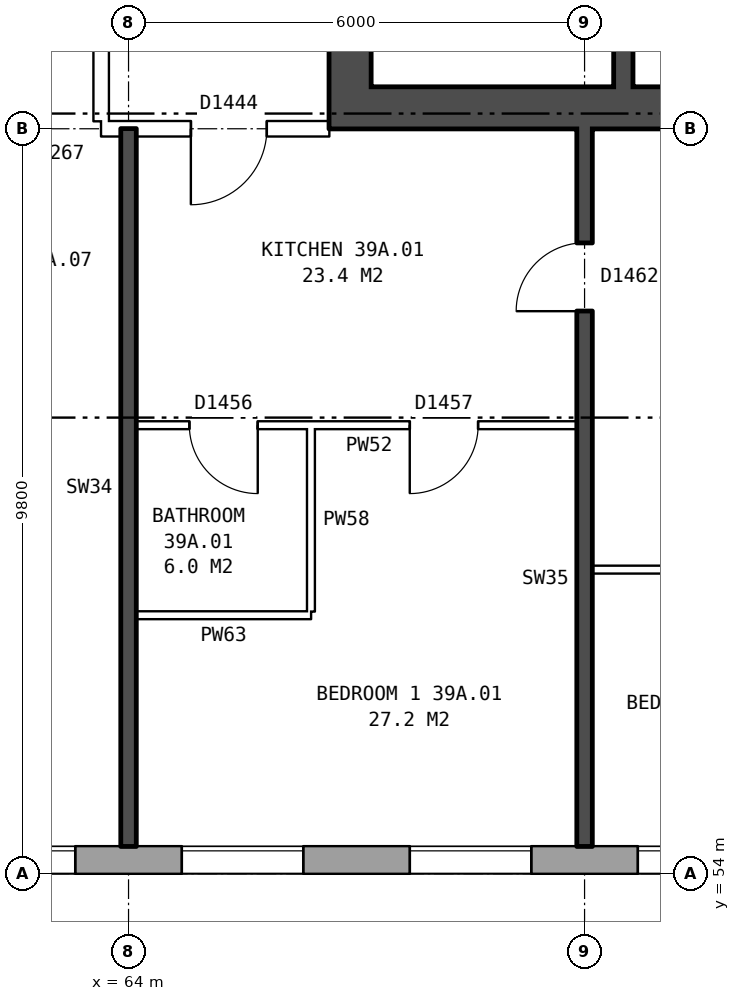
"""IFC4 building model, lengths in metres.
Left out: names, types, materials, properties, quantities, classifications, styles, units other than length and angle.
Written with IfcOpenShell. Run it as: python <this file> out.ifc"""

import sys

from ifc_helpers import new_model, si_unit, direction, frame, frame_2d, origin, place, context, subcontext, project, spatial, rectangle, extrude, element, fill, save


model = new_model("IFC4")
c1 = context("Model", 3, precision=1e-05, world=origin(), true_north=direction((0.0, 1.0)))
c2 = subcontext(c1, "Body", "Model", "MODEL_VIEW")
j1 = project(units=[si_unit("LENGTHUNIT", "METRE"), si_unit("PLANEANGLEUNIT", "RADIAN")], contexts=[c1])
p1 = place(None, origin())
s1 = spatial("IfcSite", under=j1, at=p1, CompositionType="ELEMENT")
p2 = place(p1, origin())
s2 = spatial("IfcBuilding", under=s1, at=p2, CompositionType="ELEMENT")
p3 = place(p2, frame((0.0, 0.0, 139.2)))
s3 = spatial("IfcBuildingStorey", under=s2, at=p3, CompositionType="ELEMENT", Elevation=139.2)
p4 = place(p3, frame((29.825, 54.18, 0.0), z_axis=(0.0, 0.0, 1.0), x_axis=(1.0, 0.0, 0.0)))
e1 = element("IfcWall", 1, at=p4, inside=s3, PredefinedType="STANDARD", context=c2, shape_type="SweptSolid", body=[
    extrude(rectangle(XDim=43.101, YDim=0.36, at=frame_2d((21.55, 0.0))), origin(), (0.0, 0.0, 1.0), 2.85),
])
p5 = place(p4, frame((1.875, 0.0, 0.8)))
e2 = element("IfcOpeningElement", 2, at=p5, cuts=e1, PredefinedType="OPENING", context=c2, shape_type="SweptSolid", body=[
    extrude(rectangle(XDim=1.6, YDim=1.8, at=frame_2d((0.8, 0.9))), frame((0.0, 0.19, 0.0), z_axis=(0.0, -1.0, 0.0), x_axis=(1.0, 0.0, 0.0)), (0.0, 0.0, 1.0), 0.38),
])
p6 = place(p4, frame((4.875, 0.0, 0.8)))
e3 = element("IfcOpeningElement", 3, at=p6, cuts=e1, PredefinedType="OPENING", context=c2, shape_type="SweptSolid", body=[
    extrude(rectangle(XDim=1.6, YDim=1.8, at=frame_2d((0.8, 0.9))), frame((0.0, 0.19, 0.0), z_axis=(0.0, -1.0, 0.0), x_axis=(1.0, 0.0, 0.0)), (0.0, 0.0, 1.0), 0.38),
])
p7 = place(p4, frame((7.875, 0.0, 0.8)))
e4 = element("IfcOpeningElement", 4, at=p7, cuts=e1, PredefinedType="OPENING", context=c2, shape_type="SweptSolid", body=[
    extrude(rectangle(XDim=1.6, YDim=1.8, at=frame_2d((0.8, 0.9))), frame((0.0, 0.19, 0.0), z_axis=(0.0, -1.0, 0.0), x_axis=(1.0, 0.0, 0.0)), (0.0, 0.0, 1.0), 0.38),
])
p8 = place(p4, frame((10.875, 0.0, 0.8)))
e5 = element("IfcOpeningElement", 5, at=p8, cuts=e1, PredefinedType="OPENING", context=c2, shape_type="SweptSolid", body=[
    extrude(rectangle(XDim=1.6, YDim=1.8, at=frame_2d((0.8, 0.9))), frame((0.0, 0.19, 0.0), z_axis=(0.0, -1.0, 0.0), x_axis=(1.0, 0.0, 0.0)), (0.0, 0.0, 1.0), 0.38),
])
p9 = place(p4, frame((13.875, 0.0, 0.8)))
e6 = element("IfcOpeningElement", 6, at=p9, cuts=e1, PredefinedType="OPENING", context=c2, shape_type="SweptSolid", body=[
    extrude(rectangle(XDim=1.6, YDim=1.8, at=frame_2d((0.8, 0.9))), frame((0.0, 0.19, 0.0), z_axis=(0.0, -1.0, 0.0), x_axis=(1.0, 0.0, 0.0)), (0.0, 0.0, 1.0), 0.38),
])
p10 = place(p4, frame((16.875, 0.0, 0.8)))
e7 = element("IfcOpeningElement", 7, at=p10, cuts=e1, PredefinedType="OPENING", context=c2, shape_type="SweptSolid", body=[
    extrude(rectangle(XDim=1.6, YDim=1.8, at=frame_2d((0.8, 0.9))), frame((0.0, 0.19, 0.0), z_axis=(0.0, -1.0, 0.0), x_axis=(1.0, 0.0, 0.0)), (0.0, 0.0, 1.0), 0.38),
])
p11 = place(p4, frame((20.975, 0.0, 0.15)))
e8 = element("IfcOpeningElement", 8, at=p11, cuts=e1, PredefinedType="OPENING", context=c2, shape_type="SweptSolid", body=[
    extrude(rectangle(XDim=1.0, YDim=1.5, at=frame_2d((0.5, 0.75))), frame((0.0, 0.19, 0.0), z_axis=(0.0, -1.0, 0.0), x_axis=(1.0, 0.0, 0.0)), (0.0, 0.0, 1.0), 0.38),
])
p12 = place(p4, frame((23.225, 0.0, 1.7)))
e9 = element("IfcOpeningElement", 9, at=p12, cuts=e1, PredefinedType="OPENING", context=c2, shape_type="SweptSolid", body=[
    extrude(rectangle(XDim=0.6, YDim=0.9, at=frame_2d((0.3, 0.45))), frame((0.0, 0.19, 0.0), z_axis=(0.0, -1.0, 0.0), x_axis=(1.0, 0.0, 0.0)), (0.0, 0.0, 1.0), 0.38),
])
p13 = place(p4, frame((25.875, 0.0, 0.8)))
e10 = element("IfcOpeningElement", 10, at=p13, cuts=e1, PredefinedType="OPENING", context=c2, shape_type="SweptSolid", body=[
    extrude(rectangle(XDim=1.6, YDim=1.8, at=frame_2d((0.8, 0.9))), frame((0.0, 0.19, 0.0), z_axis=(0.0, -1.0, 0.0), x_axis=(1.0, 0.0, 0.0)), (0.0, 0.0, 1.0), 0.38),
])
p14 = place(p4, frame((28.875, 0.0, 0.8)))
e11 = element("IfcOpeningElement", 11, at=p14, cuts=e1, PredefinedType="OPENING", context=c2, shape_type="SweptSolid", body=[
    extrude(rectangle(XDim=1.6, YDim=1.8, at=frame_2d((0.8, 0.9))), frame((0.0, 0.19, 0.0), z_axis=(0.0, -1.0, 0.0), x_axis=(1.0, 0.0, 0.0)), (0.0, 0.0, 1.0), 0.38),
])
p15 = place(p4, frame((31.875, 0.0, 0.8)))
e12 = element("IfcOpeningElement", 12, at=p15, cuts=e1, PredefinedType="OPENING", context=c2, shape_type="SweptSolid", body=[
    extrude(rectangle(XDim=1.6, YDim=1.8, at=frame_2d((0.8, 0.9))), frame((0.0, 0.19, 0.0), z_axis=(0.0, -1.0, 0.0), x_axis=(1.0, 0.0, 0.0)), (0.0, 0.0, 1.0), 0.38),
])
p16 = place(p4, frame((34.875, 0.0, 0.8)))
e13 = element("IfcOpeningElement", 13, at=p16, cuts=e1, PredefinedType="OPENING", context=c2, shape_type="SweptSolid", body=[
    extrude(rectangle(XDim=1.6, YDim=1.8, at=frame_2d((0.8, 0.9))), frame((0.0, 0.19, 0.0), z_axis=(0.0, -1.0, 0.0), x_axis=(1.0, 0.0, 0.0)), (0.0, 0.0, 1.0), 0.38),
])
p17 = place(p4, frame((37.875, 0.0, 0.8)))
e14 = element("IfcOpeningElement", 14, at=p17, cuts=e1, PredefinedType="OPENING", context=c2, shape_type="SweptSolid", body=[
    extrude(rectangle(XDim=1.6, YDim=1.8, at=frame_2d((0.8, 0.9))), frame((0.0, 0.19, 0.0), z_axis=(0.0, -1.0, 0.0), x_axis=(1.0, 0.0, 0.0)), (0.0, 0.0, 1.0), 0.38),
])
p18 = place(p4, frame((40.875, 0.0, 0.8)))
e15 = element("IfcOpeningElement", 15, at=p18, cuts=e1, PredefinedType="OPENING", context=c2, shape_type="SweptSolid", body=[
    extrude(rectangle(XDim=1.6, YDim=1.8, at=frame_2d((0.8, 0.9))), frame((0.0, 0.19, 0.0), z_axis=(0.0, -1.0, 0.0), x_axis=(1.0, 0.0, 0.0)), (0.0, 0.0, 1.0), 0.38),
])
p19 = place(p4, frame((24.225, 0.0, 0.8)))
e16 = element("IfcOpeningElement", 16, at=p19, cuts=e1, PredefinedType="OPENING", context=c2, shape_type="SweptSolid", body=[
    extrude(rectangle(XDim=0.8, YDim=1.8, at=frame_2d((0.4, 0.9))), frame((0.0, 0.19, 0.0), z_axis=(0.0, -1.0, 0.0), x_axis=(1.0, 0.0, 0.0)), (0.0, 0.0, 1.0), 0.38),
])
p20 = place(p3, frame((66.915, 63.8, 0.0), z_axis=(0.0, 0.0, 1.0), x_axis=(0.0, 1.0, 0.0)))
e17 = element("IfcWall", 17, at=p20, inside=s3, PredefinedType="SHEAR", context=c2, shape_type="SweptSolid", body=[
    extrude(rectangle(XDim=12.4, YDim=0.55, at=frame_2d((6.2, 0.0))), origin(), (0.0, 0.0, 1.0), 2.85),
])
p21 = place(p20, frame((1.325, 0.0, 0.0)))
e18 = element("IfcOpeningElement", 18, at=p21, cuts=e17, PredefinedType="OPENING", context=c2, shape_type="SweptSolid", body=[
    extrude(rectangle(XDim=1.1, YDim=2.1, at=frame_2d((0.55, 1.05))), frame((0.0, 0.285, 0.0), z_axis=(0.0, -1.0, 0.0), x_axis=(1.0, 0.0, 0.0)), (0.0, 0.0, 1.0), 0.57),
])
p22 = place(p20, frame((3.6, 0.0, 0.0)))
e19 = element("IfcOpeningElement", 19, at=p22, cuts=e17, PredefinedType="OPENING", context=c2, shape_type="SweptSolid", body=[
    extrude(rectangle(XDim=1.1, YDim=2.1, at=frame_2d((0.55, 1.05))), frame((0.0, 0.285, 0.0), z_axis=(0.0, -1.0, 0.0), x_axis=(1.0, 0.0, 0.0)), (0.0, 0.0, 1.0), 0.57),
])
p23 = place(p20, frame((5.8, 0.0, 0.0)))
e20 = element("IfcOpeningElement", 20, at=p23, cuts=e17, PredefinedType="OPENING", context=c2, shape_type="SweptSolid", body=[
    extrude(rectangle(XDim=1.1, YDim=2.1, at=frame_2d((0.55, 1.05))), frame((0.0, 0.285, 0.0), z_axis=(0.0, -1.0, 0.0), x_axis=(1.0, 0.0, 0.0)), (0.0, 0.0, 1.0), 0.57),
])
p24 = place(p20, frame((8.0, 0.0, 0.0)))
e21 = element("IfcOpeningElement", 21, at=p24, cuts=e17, PredefinedType="OPENING", context=c2, shape_type="SweptSolid", body=[
    extrude(rectangle(XDim=1.1, YDim=2.1, at=frame_2d((0.55, 1.05))), frame((0.0, 0.285, 0.0), z_axis=(0.0, -1.0, 0.0), x_axis=(1.0, 0.0, 0.0)), (0.0, 0.0, 1.0), 0.57),
])
p25 = place(p20, frame((9.9, 0.0, 0.0)))
e22 = element("IfcOpeningElement", 22, at=p25, cuts=e17, PredefinedType="OPENING", context=c2, shape_type="SweptSolid", body=[
    extrude(rectangle(XDim=1.1, YDim=2.1, at=frame_2d((0.55, 1.05))), frame((0.0, 0.285, 0.0), z_axis=(0.0, -1.0, 0.0), x_axis=(1.0, 0.0, 0.0)), (0.0, 0.0, 1.0), 0.57),
])
p26 = place(p3, frame((67.19, 64.075, 0.0), z_axis=(0.0, 0.0, 1.0), x_axis=(1.0, 0.0, 0.0)))
e23 = element("IfcWall", 23, at=p26, inside=s3, PredefinedType="SHEAR", context=c2, shape_type="SweptSolid", body=[
    extrude(rectangle(XDim=7.9, YDim=0.55, at=frame_2d((3.95, 0.0))), origin(), (0.0, 0.0, 1.0), 2.85),
])
p27 = place(p3, frame((70.51, 64.35, 0.0), z_axis=(0.0, 0.0, 1.0), x_axis=(0.0, 1.0, 0.0)))
e24 = element("IfcWall", 24, at=p27, inside=s3, PredefinedType="SHEAR", context=c2, shape_type="SweptSolid", body=[
    extrude(rectangle(XDim=2.375, YDim=0.25, at=frame_2d((1.188, 0.0))), origin(), (0.0, 0.0, 1.0), 2.85),
])
p28 = place(p3, frame((63.64, 63.9, 0.0), z_axis=(0.0, 0.0, 1.0), x_axis=(0.0, 1.0, 0.0)))
e25 = element("IfcWall", 25, at=p28, inside=s3, PredefinedType="PARTITIONING", context=c2, shape_type="SweptSolid", body=[
    extrude(rectangle(XDim=12.2, YDim=0.2, at=frame_2d((6.1, 0.0))), origin(), (0.0, 0.0, 1.0), 2.85),
])
p29 = place(p28, frame((5.1, 0.0, 0.0)))
e26 = element("IfcOpeningElement", 26, at=p29, cuts=e25, PredefinedType="OPENING", context=c2, shape_type="SweptSolid", body=[
    extrude(rectangle(XDim=2.0, YDim=2.1, at=frame_2d((1.0, 1.05))), frame((0.0, 0.11, 0.0), z_axis=(0.0, -1.0, 0.0), x_axis=(1.0, 0.0, 0.0)), (0.0, 0.0, 1.0), 0.22),
])
p30 = place(p3, frame((64.1, 57.4, 0.0), z_axis=(0.0, 0.0, 1.0), x_axis=(1.0, 0.0, 0.0)))
e27 = element("IfcWall", 27, at=p30, inside=s3, PredefinedType="PARTITIONING", context=c2, shape_type="SweptSolid", body=[
    extrude(rectangle(XDim=2.3, YDim=0.1, at=frame_2d((1.15, 0.0))), origin(), (0.0, 0.0, 1.0), 2.85),
])
p31 = place(p3, frame((70.1, 58.0, 0.0), z_axis=(0.0, 0.0, 1.0), x_axis=(1.0, 0.0, 0.0)))
e28 = element("IfcWall", 28, at=p31, inside=s3, PredefinedType="PARTITIONING", context=c2, shape_type="SweptSolid", body=[
    extrude(rectangle(XDim=5.54, YDim=0.1, at=frame_2d((2.77, 0.0))), origin(), (0.0, 0.0, 1.0), 2.85),
])
p32 = place(p31, frame((2.32, 0.0, 0.0)))
e29 = element("IfcOpeningElement", 29, at=p32, cuts=e28, PredefinedType="OPENING", context=c2, shape_type="SweptSolid", body=[
    extrude(rectangle(XDim=0.9, YDim=2.1, at=frame_2d((0.45, 1.05))), frame((0.0, 0.06, 0.0), z_axis=(0.0, -1.0, 0.0), x_axis=(1.0, 0.0, 0.0)), (0.0, 0.0, 1.0), 0.12),
])
p33 = place(p3, frame((64.1, 59.9, 0.0), z_axis=(0.0, 0.0, 1.0), x_axis=(1.0, 0.0, 0.0)))
e30 = element("IfcWall", 30, at=p33, inside=s3, PredefinedType="PARTITIONING", context=c2, shape_type="SweptSolid", body=[
    extrude(rectangle(XDim=5.8, YDim=0.1, at=frame_2d((2.9, 0.0))), origin(), (0.0, 0.0, 1.0), 2.85),
])
p34 = place(p33, frame((3.6, 0.0, 0.0)))
e31 = element("IfcOpeningElement", 31, at=p34, cuts=e30, PredefinedType="OPENING", context=c2, shape_type="SweptSolid", body=[
    extrude(rectangle(XDim=0.9, YDim=2.1, at=frame_2d((0.45, 1.05))), frame((0.0, 0.06, 0.0), z_axis=(0.0, -1.0, 0.0), x_axis=(1.0, 0.0, 0.0)), (0.0, 0.0, 1.0), 0.12),
])
p35 = place(p33, frame((0.7, 0.0, 0.0)))
e32 = element("IfcOpeningElement", 32, at=p35, cuts=e30, PredefinedType="OPENING", context=c2, shape_type="SweptSolid", body=[
    extrude(rectangle(XDim=0.9, YDim=2.1, at=frame_2d((0.45, 1.05))), frame((0.0, 0.06, 0.0), z_axis=(0.0, -1.0, 0.0), x_axis=(1.0, 0.0, 0.0)), (0.0, 0.0, 1.0), 0.12),
])
p36 = place(p3, frame((63.64, 63.8, 0.0), z_axis=(0.0, 0.0, 1.0), x_axis=(1.0, 0.0, 0.0)))
e33 = element("IfcWall", 33, at=p36, inside=s3, PredefinedType="PARTITIONING", context=c2, shape_type="SweptSolid", body=[
    extrude(rectangle(XDim=3.0, YDim=0.2, at=frame_2d((1.5, 0.0))), origin(), (0.0, 0.0, 1.0), 2.85),
])
p37 = place(p36, frame((1.18, 0.0, 0.0)))
e34 = element("IfcOpeningElement", 34, at=p37, cuts=e33, PredefinedType="OPENING", context=c2, shape_type="SweptSolid", body=[
    extrude(rectangle(XDim=1.0, YDim=2.1, at=frame_2d((0.5, 1.05))), frame((0.0, 0.11, 0.0), z_axis=(0.0, -1.0, 0.0), x_axis=(1.0, 0.0, 0.0)), (0.0, 0.0, 1.0), 0.22),
])
p38 = place(p3, frame((64.0, 54.36, 0.0), z_axis=(0.0, 0.0, 1.0), x_axis=(0.0, 1.0, 0.0)))
e35 = element("IfcWall", 35, at=p38, inside=s3, PredefinedType="SOLIDWALL", context=c2, shape_type="SweptSolid", body=[
    extrude(rectangle(XDim=9.44, YDim=0.2, at=frame_2d((4.72, 0.0))), origin(), (0.0, 0.0, 1.0), 2.85),
])
p39 = place(p3, frame((66.4, 57.45, 0.0), z_axis=(0.0, 0.0, 1.0), x_axis=(0.0, 1.0, 0.0)))
e36 = element("IfcWall", 36, at=p39, inside=s3, PredefinedType="PARTITIONING", context=c2, shape_type="SweptSolid", body=[
    extrude(rectangle(XDim=2.4, YDim=0.1, at=frame_2d((1.2, 0.0))), origin(), (0.0, 0.0, 1.0), 2.85),
])
p40 = place(p3, frame((70.0, 54.36, 0.0), z_axis=(0.0, 0.0, 1.0), x_axis=(0.0, 1.0, 0.0)))
e37 = element("IfcWall", 37, at=p40, inside=s3, PredefinedType="SOLIDWALL", context=c2, shape_type="SweptSolid", body=[
    extrude(rectangle(XDim=9.44, YDim=0.2, at=frame_2d((4.72, 0.0))), origin(), (0.0, 0.0, 1.0), 2.85),
])
p41 = place(p40, frame((7.04, 0.0, 0.0)))
e38 = element("IfcOpeningElement", 38, at=p41, cuts=e37, PredefinedType="OPENING", context=c2, shape_type="SweptSolid", body=[
    extrude(rectangle(XDim=0.9, YDim=2.1, at=frame_2d((0.45, 1.05))), frame((0.0, 0.11, 0.0), z_axis=(0.0, -1.0, 0.0), x_axis=(1.0, 0.0, 0.0)), (0.0, 0.0, 1.0), 0.22),
])
p42 = place(p15, origin())
e39 = element("IfcWindow", 39, at=p42, inside=s3, PartitioningType="SINGLE_PANEL", PredefinedType="WINDOW", context=c2, shape_type="SweptSolid", body=[
    extrude(rectangle(XDim=1.6, YDim=1.8, at=frame_2d((0.8, 0.9))), frame((0.0, 0.15, 0.0), z_axis=(0.0, -1.0, 0.0), x_axis=(1.0, 0.0, 0.0)), (0.0, 0.0, 1.0), 0.06),
])
fill(e12, e39)
p43 = place(p16, origin())
e40 = element("IfcWindow", 40, at=p43, inside=s3, PartitioningType="SINGLE_PANEL", PredefinedType="WINDOW", context=c2, shape_type="SweptSolid", body=[
    extrude(rectangle(XDim=1.6, YDim=1.8, at=frame_2d((0.8, 0.9))), frame((0.0, 0.15, 0.0), z_axis=(0.0, -1.0, 0.0), x_axis=(1.0, 0.0, 0.0)), (0.0, 0.0, 1.0), 0.06),
])
fill(e13, e40)
p44 = place(p17, origin())
e41 = element("IfcWindow", 41, at=p44, inside=s3, PartitioningType="SINGLE_PANEL", PredefinedType="WINDOW", context=c2, shape_type="SweptSolid", body=[
    extrude(rectangle(XDim=1.6, YDim=1.8, at=frame_2d((0.8, 0.9))), frame((0.0, 0.15, 0.0), z_axis=(0.0, -1.0, 0.0), x_axis=(1.0, 0.0, 0.0)), (0.0, 0.0, 1.0), 0.06),
])
fill(e14, e41)
p45 = place(p18, origin())
e42 = element("IfcWindow", 42, at=p45, inside=s3, PartitioningType="SINGLE_PANEL", PredefinedType="WINDOW", context=c2, shape_type="SweptSolid", body=[
    extrude(rectangle(XDim=1.6, YDim=1.8, at=frame_2d((0.8, 0.9))), frame((0.0, 0.15, 0.0), z_axis=(0.0, -1.0, 0.0), x_axis=(1.0, 0.0, 0.0)), (0.0, 0.0, 1.0), 0.06),
])
fill(e15, e42)
p46 = place(p34, frame((0.9, 0.0, 0.0), z_axis=(0.0, 0.0, 1.0), x_axis=(-1.0, 0.0, 0.0)))
e43 = element("IfcDoor", 43, at=p46, inside=s3, OperationType="SINGLE_SWING_RIGHT", PredefinedType="DOOR", context=c2, shape_type="SweptSolid", body=[
    extrude(rectangle(XDim=0.9, YDim=2.1, at=frame_2d((0.45, 1.05))), frame((0.0, 0.025, 0.0), z_axis=(0.0, -1.0, 0.0), x_axis=(1.0, 0.0, 0.0)), (0.0, 0.0, 1.0), 0.05),
])
fill(e31, e43)
p47 = place(p37, frame((1.0, 0.0, 0.0), z_axis=(0.0, 0.0, 1.0), x_axis=(-1.0, 0.0, 0.0)))
e44 = element("IfcDoor", 44, at=p47, inside=s3, OperationType="SINGLE_SWING_RIGHT", PredefinedType="DOOR", context=c2, shape_type="SweptSolid", body=[
    extrude(rectangle(XDim=1.0, YDim=2.1, at=frame_2d((0.5, 1.05))), frame((0.0, 0.025, 0.0), z_axis=(0.0, -1.0, 0.0), x_axis=(1.0, 0.0, 0.0)), (0.0, 0.0, 1.0), 0.05),
])
fill(e34, e44)
p48 = place(p41, origin())
e45 = element("IfcDoor", 45, at=p48, inside=s3, OperationType="SINGLE_SWING_LEFT", PredefinedType="DOOR", context=c2, shape_type="SweptSolid", body=[
    extrude(rectangle(XDim=0.9, YDim=2.1, at=frame_2d((0.45, 1.05))), frame((0.0, 0.025, 0.0), z_axis=(0.0, -1.0, 0.0), x_axis=(1.0, 0.0, 0.0)), (0.0, 0.0, 1.0), 0.05),
])
fill(e38, e45)
p49 = place(p35, frame((0.9, 0.0, 0.0), z_axis=(0.0, 0.0, 1.0), x_axis=(-1.0, 0.0, 0.0)))
e46 = element("IfcDoor", 46, at=p49, inside=s3, OperationType="SINGLE_SWING_LEFT", PredefinedType="DOOR", context=c2, shape_type="SweptSolid", body=[
    extrude(rectangle(XDim=0.9, YDim=2.1, at=frame_2d((0.45, 1.05))), frame((0.0, 0.025, 0.0), z_axis=(0.0, -1.0, 0.0), x_axis=(1.0, 0.0, 0.0)), (0.0, 0.0, 1.0), 0.05),
])
fill(e32, e46)
save(model, sys.argv[1])
